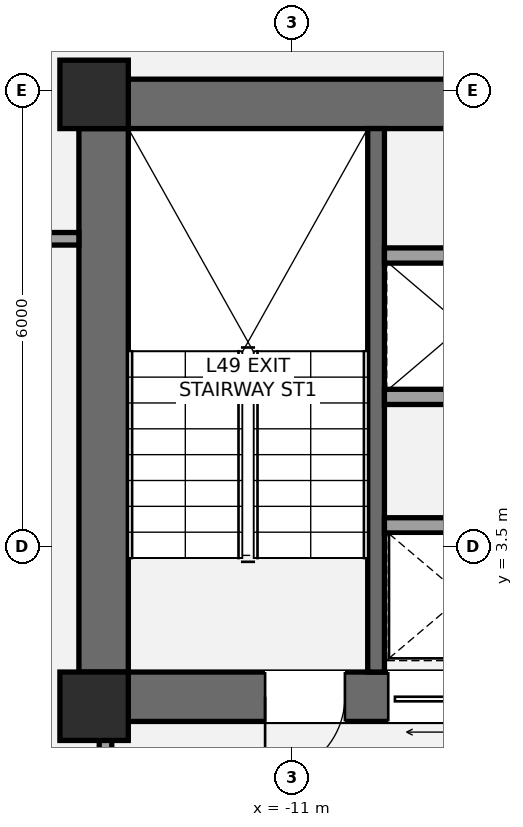
"""IFC4 building model, lengths in metres.
Left out: names, types, materials, properties, quantities, classifications, styles, units other than length and angle.
Written with IfcOpenShell. Run it as: python <this file> out.ifc"""

import sys

from ifc_helpers import new_model, si_unit, direction, frame, frame_2d, origin, origin_2d, place, context, subcontext, project, spatial, rectangle, extrude, element, fill, save


model = new_model("IFC4")
c1 = context("Model", 3, precision=1e-05, world=origin(), true_north=direction((0.0, 1.0)))
c2 = subcontext(c1, "Body", "Model", "MODEL_VIEW")
j1 = project(units=[si_unit("LENGTHUNIT", "METRE"), si_unit("PLANEANGLEUNIT", "RADIAN")], contexts=[c1])
p1 = place(None, origin())
s1 = spatial("IfcSite", under=j1, at=p1, CompositionType="ELEMENT")
p2 = place(p1, origin())
s2 = spatial("IfcBuilding", under=s1, at=p2, CompositionType="ELEMENT")
p3 = place(p2, frame((0.0, 0.0, 179.0)))
s3 = spatial("IfcBuildingStorey", under=s2, at=p3, CompositionType="ELEMENT", Elevation=179.0)
p4 = place(p3, frame((-13.475, 1.2, 0.0), z_axis=(0.0, 0.0, 1.0), x_axis=(0.0, 1.0, 0.0)))
e1 = element("IfcWall", 1, at=p4, inside=s3, PredefinedType="SHEAR", context=c2, shape_type="SweptSolid", body=[
    extrude(rectangle(XDim=8.45, YDim=0.65, at=frame_2d((4.225, 0.0))), origin(), (0.0, 0.0, 1.0), 3.2),
])
p5 = place(p3, frame((-13.8, 9.325, 0.0), z_axis=(0.0, 0.0, 1.0), x_axis=(1.0, 0.0, 0.0)))
e2 = element("IfcWall", 2, at=p5, inside=s3, PredefinedType="SHEAR", context=c2, shape_type="SweptSolid", body=[
    extrude(rectangle(XDim=9.325, YDim=0.65, at=frame_2d((4.663, 0.0))), origin(), (0.0, 0.0, 1.0), 3.2),
])
p6 = place(p3, frame((-4.875, 1.525, 0.0), z_axis=(0.0, 0.0, 1.0), x_axis=(-1.0, 0.0, 0.0)))
e3 = element("IfcWall", 3, at=p6, inside=s3, PredefinedType="SHEAR", context=c2, shape_type="SweptSolid", body=[
    extrude(rectangle(XDim=8.925, YDim=0.65, at=frame_2d((4.462, 0.0))), origin(), (0.0, 0.0, 1.0), 3.2),
])
p7 = place(p6, frame((5.425, 0.0, 0.0)))
e4 = element("IfcOpeningElement", 4, at=p7, cuts=e3, PredefinedType="OPENING", context=c2, shape_type="SweptSolid", body=[
    extrude(rectangle(XDim=1.05, YDim=2.15, at=frame_2d((0.525, 1.075))), frame((0.0, 0.335, 0.0), z_axis=(0.0, -1.0, 0.0), x_axis=(1.0, 0.0, 0.0)), (0.0, 0.0, 1.0), 0.67),
])
p8 = place(p6, frame((3.755, 0.0, 0.0)))
e5 = element("IfcOpeningElement", 5, at=p8, cuts=e3, PredefinedType="OPENING", context=c2, shape_type="SweptSolid", body=[
    extrude(rectangle(XDim=1.1, YDim=2.2, at=frame_2d((0.55, 1.1))), frame((0.0, 0.335, 0.0), z_axis=(0.0, -1.0, 0.0), x_axis=(1.0, 0.0, 0.0)), (0.0, 0.0, 1.0), 0.67),
])
p9 = place(p3, frame((-9.89, 1.85, 0.0), z_axis=(0.0, 0.0, 1.0), x_axis=(0.0, 1.0, 0.0)))
e6 = element("IfcWall", 6, at=p9, inside=s3, PredefinedType="SHEAR", context=c2, shape_type="SweptSolid", body=[
    extrude(rectangle(XDim=7.15, YDim=0.22, at=frame_2d((3.575, 0.0))), origin(), (0.0, 0.0, 1.0), 3.2),
])
for number, where, z_axis, x_axis in (
    (7, (-13.6, 1.4, 0.0), (0.0, 0.0, 1.0), (1.0, 0.0, 0.0)),
    (8, (-13.6, 9.45, 0.0), (0.0, 0.0, 1.0), (1.0, 0.0, 0.0)),
):
    element("IfcColumn", number, at=place(p3, frame(where, z_axis=z_axis, x_axis=x_axis)), inside=s3, PredefinedType="COLUMN", context=c2, shape_type="SweptSolid", body=[
        extrude(rectangle(XDim=0.9, YDim=0.9, at=origin_2d()), origin(), (0.0, 0.0, 1.0), 3.2),
    ])
p10 = place(p3, frame((-13.45, -2.15, 0.0), z_axis=(0.0, 0.0, 1.0), x_axis=(0.0, 1.0, 0.0)))
e9 = element("IfcWall", 9, at=p10, inside=s3, PredefinedType="PARTITIONING", context=c2, shape_type="SweptSolid", body=[
    extrude(rectangle(XDim=3.4, YDim=0.165, at=frame_2d((1.7, 0.0))), origin(), (0.0, 0.0, 1.0), 2.473),
])
p11 = place(p10, frame((1.15, 0.0, 0.0)))
e10 = element("IfcOpeningElement", 10, at=p11, cuts=e9, PredefinedType="OPENING", context=c2, shape_type="SweptSolid", body=[
    extrude(rectangle(XDim=1.05, YDim=2.15, at=frame_2d((0.525, 1.075))), frame((0.0, 0.093, 0.0), z_axis=(0.0, -1.0, 0.0), x_axis=(1.0, 0.0, 0.0)), (0.0, 0.0, 1.0), 0.185),
])
for number, where, z_axis, x_axis in (
    (11, (-9.78, 3.78, 0.0), (0.0, 0.0, 1.0), (1.0, 0.0, 0.0)),
    (12, (-9.78, 5.47, 0.0), (0.0, 0.0, 1.0), (1.0, 0.0, 0.0)),
    (13, (-9.78, 7.33, 0.0), (0.0, 0.0, 1.0), (1.0, 0.0, 0.0)),
):
    element("IfcWall", number, at=place(p3, frame(where, z_axis=z_axis, x_axis=x_axis)), inside=s3, PredefinedType="SOLIDWALL", context=c2, shape_type="SweptSolid", body=[
        extrude(rectangle(XDim=4.255, YDim=0.2, at=frame_2d((2.127, 0.0))), origin(), (0.0, 0.0, 1.0), 3.02),
    ])
p12 = place(p3, frame((-15.55, 7.55, 0.0), z_axis=(0.0, 0.0, 1.0), x_axis=(1.0, 0.0, 0.0)))
e14 = element("IfcWall", 14, at=p12, inside=s3, PredefinedType="PARTITIONING", context=c2, shape_type="SweptSolid", body=[
    extrude(rectangle(XDim=1.75, YDim=0.165, at=frame_2d((0.875, 0.0))), origin(), (0.0, 0.0, 1.0), 3.02),
])
p13 = place(p12, frame((0.3, 0.0, 0.0)))
e15 = element("IfcOpeningElement", 15, at=p13, cuts=e14, PredefinedType="OPENING", context=c2, shape_type="SweptSolid", body=[
    extrude(rectangle(XDim=1.0, YDim=2.15, at=frame_2d((0.5, 1.075))), frame((0.0, 0.093, 0.0), z_axis=(0.0, -1.0, 0.0), x_axis=(1.0, 0.0, 0.0)), (0.0, 0.0, 1.0), 0.185),
])
p14 = place(p7, origin())
e16 = element("IfcDoor", 16, at=p14, inside=s3, OperationType="SINGLE_SWING_RIGHT", PredefinedType="DOOR", context=c2, shape_type="SweptSolid", body=[
    extrude(rectangle(XDim=1.05, YDim=2.15, at=frame_2d((0.525, 1.075))), frame((0.0, 0.025, 0.0), z_axis=(0.0, -1.0, 0.0), x_axis=(1.0, 0.0, 0.0)), (0.0, 0.0, 1.0), 0.05),
])
fill(e4, e16)
p15 = place(p8, origin())
e17 = element("IfcDoor", 17, at=p15, inside=s3, OperationType="SLIDING_TO_LEFT", PredefinedType="DOOR", context=c2, shape_type="SweptSolid", body=[
    extrude(rectangle(XDim=1.1, YDim=2.2, at=frame_2d((0.55, 1.1))), frame((0.0, 0.025, 0.0), z_axis=(0.0, -1.0, 0.0), x_axis=(1.0, 0.0, 0.0)), (0.0, 0.0, 1.0), 0.05),
])
fill(e5, e17)
save(model, sys.argv[1])
